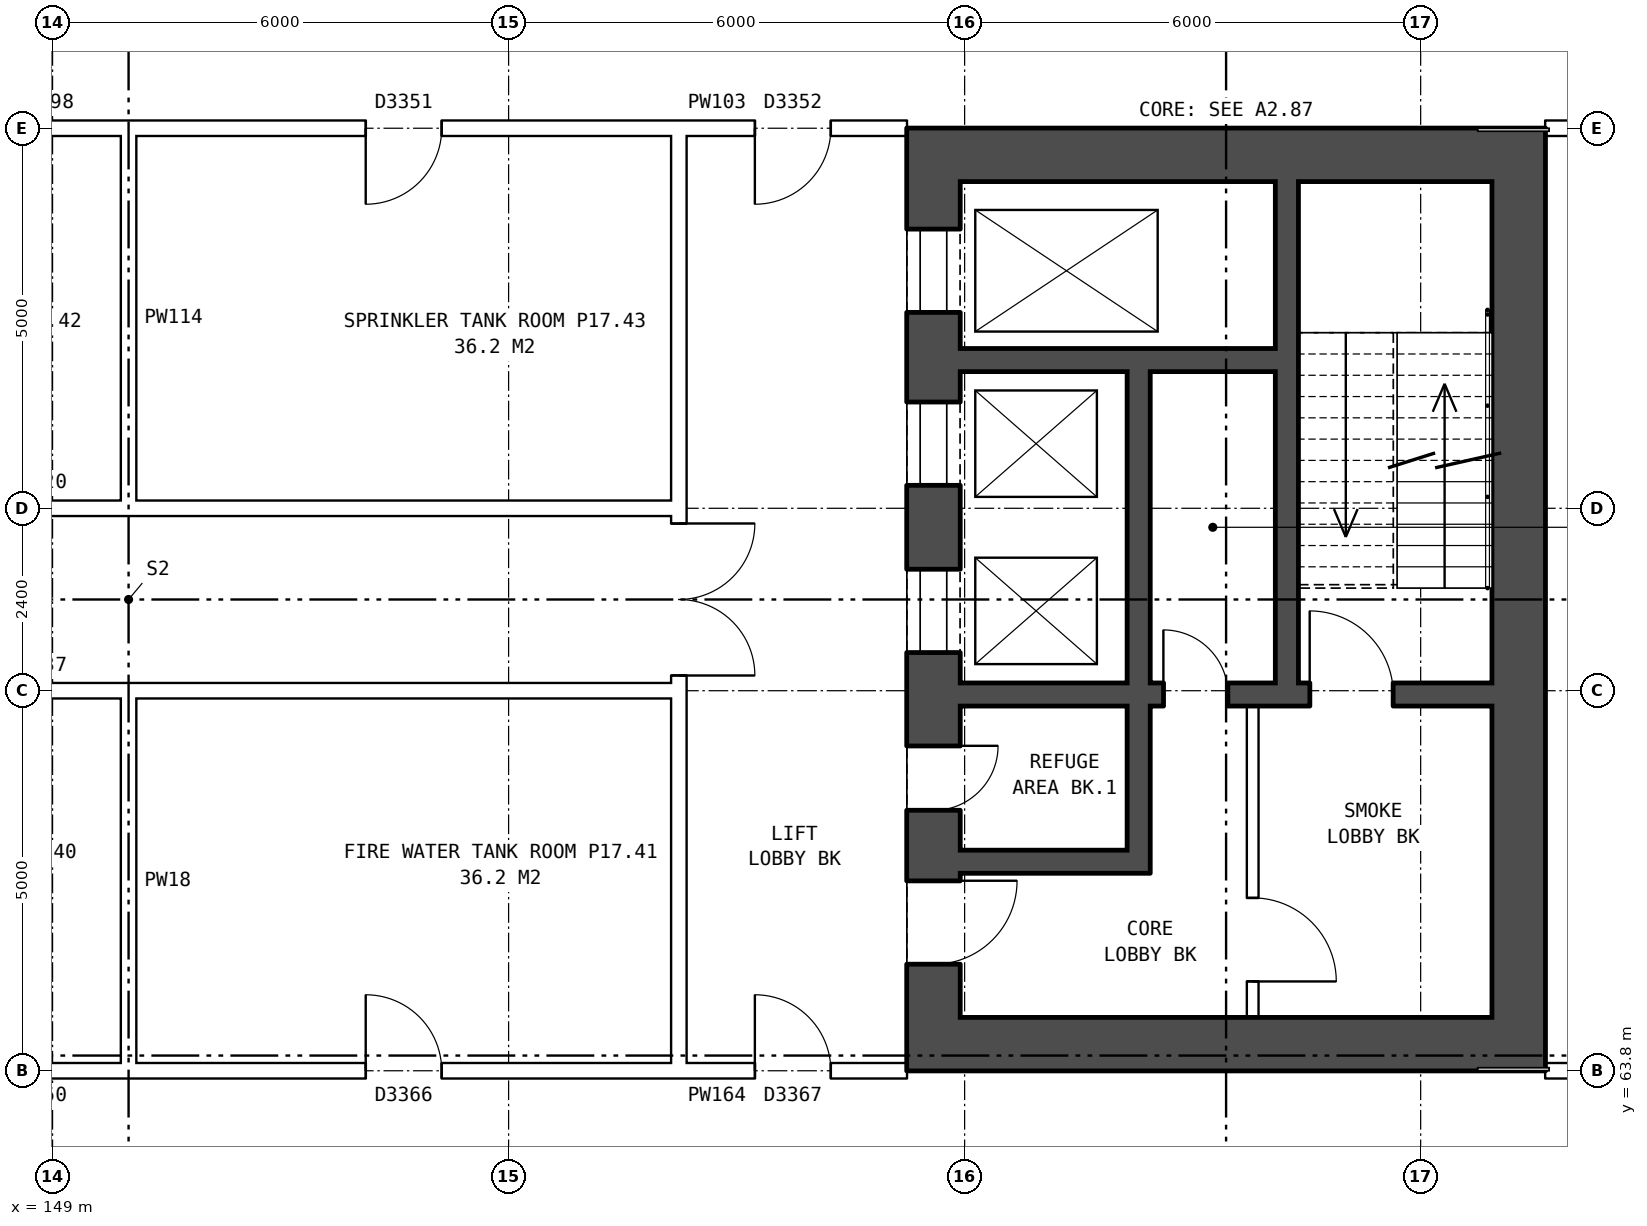
"""IFC4 building model, lengths in metres.
Left out: names, types, materials, properties, quantities, classifications, styles, units other than length and angle.
Written with IfcOpenShell. Run it as: python <this file> out.ifc"""

import sys

from ifc_helpers import new_model, si_unit, direction, frame, frame_2d, origin, place, context, subcontext, project, spatial, rectangle, extrude, element, fill, save


model = new_model("IFC4")
c1 = context("Model", 3, precision=1e-05, world=origin(), true_north=direction((0.0, 1.0)))
c2 = subcontext(c1, "Body", "Model", "MODEL_VIEW")
j1 = project(units=[si_unit("LENGTHUNIT", "METRE"), si_unit("PLANEANGLEUNIT", "RADIAN")], contexts=[c1])
p1 = place(None, origin())
s1 = spatial("IfcSite", under=j1, at=p1, CompositionType="ELEMENT")
p2 = place(p1, origin())
s2 = spatial("IfcBuilding", under=s1, at=p2, CompositionType="ELEMENT")
p3 = place(p2, frame((0.0, 0.0, 62.9)))
s3 = spatial("IfcBuildingStorey", under=s2, at=p3, CompositionType="ELEMENT", Elevation=62.9)
p4 = place(p3, frame((160.59, 75.5, 0.0), z_axis=(0.0, 0.0, 1.0), x_axis=(0.0, -1.0, 0.0)))
e1 = element("IfcWall", 1, at=p4, inside=s3, PredefinedType="SHEAR", context=c2, shape_type="SweptSolid", body=[
    extrude(rectangle(XDim=11.0, YDim=0.7, at=frame_2d((5.5, 0.0))), origin(), (0.0, 0.0, 1.0), 4.2),
])
p5 = place(p4, frame((0.625, 0.0, 0.0)))
e2 = element("IfcOpeningElement", 2, at=p5, cuts=e1, PredefinedType="OPENING", context=c2, shape_type="SweptSolid", body=[
    extrude(rectangle(XDim=1.1, YDim=2.1, at=frame_2d((0.55, 1.05))), frame((0.0, 0.36, 0.0), z_axis=(0.0, -1.0, 0.0), x_axis=(1.0, 0.0, 0.0)), (0.0, 0.0, 1.0), 0.72),
])
p6 = place(p4, frame((2.9, 0.0, 0.0)))
e3 = element("IfcOpeningElement", 3, at=p6, cuts=e1, PredefinedType="OPENING", context=c2, shape_type="SweptSolid", body=[
    extrude(rectangle(XDim=1.1, YDim=2.1, at=frame_2d((0.55, 1.05))), frame((0.0, 0.36, 0.0), z_axis=(0.0, -1.0, 0.0), x_axis=(1.0, 0.0, 0.0)), (0.0, 0.0, 1.0), 0.72),
])
p7 = place(p4, frame((5.1, 0.0, 0.0)))
e4 = element("IfcOpeningElement", 4, at=p7, cuts=e1, PredefinedType="OPENING", context=c2, shape_type="SweptSolid", body=[
    extrude(rectangle(XDim=1.1, YDim=2.1, at=frame_2d((0.55, 1.05))), frame((0.0, 0.36, 0.0), z_axis=(0.0, -1.0, 0.0), x_axis=(1.0, 0.0, 0.0)), (0.0, 0.0, 1.0), 0.72),
])
p8 = place(p4, frame((9.2, 0.0, 0.0)))
e5 = element("IfcOpeningElement", 5, at=p8, cuts=e1, PredefinedType="OPENING", context=c2, shape_type="SweptSolid", body=[
    extrude(rectangle(XDim=1.1, YDim=2.1, at=frame_2d((0.55, 1.05))), frame((0.0, 0.36, 0.0), z_axis=(0.0, -1.0, 0.0), x_axis=(1.0, 0.0, 0.0)), (0.0, 0.0, 1.0), 0.72),
])
p9 = place(p4, frame((7.425, 0.0, 0.0)))
e6 = element("IfcOpeningElement", 6, at=p9, cuts=e1, PredefinedType="OPENING", context=c2, shape_type="SweptSolid", body=[
    extrude(rectangle(XDim=0.85, YDim=2.1, at=frame_2d((0.425, 1.05))), frame((0.0, 0.36, 0.0), z_axis=(0.0, -1.0, 0.0), x_axis=(1.0, 0.0, 0.0)), (0.0, 0.0, 1.0), 0.72),
])
p10 = place(p3, frame((168.29, 75.5, 0.0), z_axis=(0.0, 0.0, 1.0), x_axis=(0.0, -1.0, 0.0)))
e7 = element("IfcWall", 7, at=p10, inside=s3, PredefinedType="SHEAR", context=c2, shape_type="SweptSolid", body=[
    extrude(rectangle(XDim=11.0, YDim=0.7, at=frame_2d((5.5, 0.0))), origin(), (0.0, 0.0, 1.0), 4.2),
])
for number, where, z_axis, x_axis in (
    (8, (160.24, 75.85, 0.0), (0.0, 0.0, 1.0), (1.0, 0.0, 0.0)),
    (9, (160.24, 64.15, 0.0), (0.0, 0.0, 1.0), (1.0, 0.0, 0.0)),
):
    element("IfcWall", number, at=place(p3, frame(where, z_axis=z_axis, x_axis=x_axis)), inside=s3, PredefinedType="SHEAR", context=c2, shape_type="SweptSolid", body=[
        extrude(rectangle(XDim=8.4, YDim=0.7, at=frame_2d((4.2, 0.0))), origin(), (0.0, 0.0, 1.0), 4.2),
    ])
p11 = place(p3, frame((160.94, 73.15, 0.0), z_axis=(0.0, 0.0, 1.0), x_axis=(1.0, 0.0, 0.0)))
e10 = element("IfcWall", 10, at=p11, inside=s3, PredefinedType="SHEAR", context=c2, shape_type="SweptSolid", body=[
    extrude(rectangle(XDim=4.15, YDim=0.3, at=frame_2d((2.075, 0.0))), origin(), (0.0, 0.0, 1.0), 4.2),
])
p12 = place(p3, frame((160.94, 68.75, 0.0), z_axis=(0.0, 0.0, 1.0), x_axis=(1.0, 0.0, 0.0)))
e11 = element("IfcWall", 11, at=p12, inside=s3, PredefinedType="SHEAR", context=c2, shape_type="SweptSolid", body=[
    extrude(rectangle(XDim=7.0, YDim=0.3, at=frame_2d((3.5, 0.0))), origin(), (0.0, 0.0, 1.0), 4.2),
])
p13 = place(p12, frame((4.6, 0.0, 0.0)))
e12 = element("IfcOpeningElement", 12, at=p13, cuts=e11, PredefinedType="OPENING", context=c2, shape_type="SweptSolid", body=[
    extrude(rectangle(XDim=1.1, YDim=2.1, at=frame_2d((0.55, 1.05))), frame((0.0, 0.16, 0.0), z_axis=(0.0, -1.0, 0.0), x_axis=(1.0, 0.0, 0.0)), (0.0, 0.0, 1.0), 0.32),
])
p14 = place(p12, frame((2.675, 0.0, 0.0)))
e13 = element("IfcOpeningElement", 13, at=p14, cuts=e11, PredefinedType="OPENING", context=c2, shape_type="SweptSolid", body=[
    extrude(rectangle(XDim=0.85, YDim=2.1, at=frame_2d((0.425, 1.05))), frame((0.0, 0.16, 0.0), z_axis=(0.0, -1.0, 0.0), x_axis=(1.0, 0.0, 0.0)), (0.0, 0.0, 1.0), 0.32),
])
p15 = place(p3, frame((160.94, 66.55, 0.0), z_axis=(0.0, 0.0, 1.0), x_axis=(1.0, 0.0, 0.0)))
e14 = element("IfcWall", 14, at=p15, inside=s3, PredefinedType="SHEAR", context=c2, shape_type="SweptSolid", body=[
    extrude(rectangle(XDim=2.2, YDim=0.3, at=frame_2d((1.1, 0.0))), origin(), (0.0, 0.0, 1.0), 4.2),
])
p16 = place(p3, frame((163.29, 73.0, 0.0), z_axis=(0.0, 0.0, 1.0), x_axis=(0.0, -1.0, 0.0)))
e15 = element("IfcWall", 15, at=p16, inside=s3, PredefinedType="SHEAR", context=c2, shape_type="SweptSolid", body=[
    extrude(rectangle(XDim=4.1, YDim=0.3, at=frame_2d((2.05, 0.0))), origin(), (0.0, 0.0, 1.0), 4.2),
])
p17 = place(p3, frame((163.29, 68.6, 0.0), z_axis=(0.0, 0.0, 1.0), x_axis=(0.0, -1.0, 0.0)))
e16 = element("IfcWall", 16, at=p17, inside=s3, PredefinedType="SHEAR", context=c2, shape_type="SweptSolid", body=[
    extrude(rectangle(XDim=2.2, YDim=0.3, at=frame_2d((1.1, 0.0))), origin(), (0.0, 0.0, 1.0), 4.2),
])
p18 = place(p3, frame((164.79, 68.6, 0.0), z_axis=(0.0, 0.0, 1.0), x_axis=(0.0, -1.0, 0.0)))
e17 = element("IfcWall", 17, at=p18, inside=s3, PredefinedType="PARTITIONING", context=c2, shape_type="SweptSolid", body=[
    extrude(rectangle(XDim=4.1, YDim=0.15, at=frame_2d((2.05, 0.0))), origin(), (0.0, 0.0, 1.0), 4.2),
])
p19 = place(p18, frame((2.525, 0.0, 0.0)))
e18 = element("IfcOpeningElement", 18, at=p19, cuts=e17, PredefinedType="OPENING", context=c2, shape_type="SweptSolid", body=[
    extrude(rectangle(XDim=1.1, YDim=2.1, at=frame_2d((0.55, 1.05))), frame((0.0, 0.085, 0.0), z_axis=(0.0, -1.0, 0.0), x_axis=(1.0, 0.0, 0.0)), (0.0, 0.0, 1.0), 0.17),
])
p20 = place(p3, frame((165.24, 75.5, 0.0), z_axis=(0.0, 0.0, 1.0), x_axis=(0.0, -1.0, 0.0)))
e19 = element("IfcWall", 19, at=p20, inside=s3, PredefinedType="SHEAR", context=c2, shape_type="SweptSolid", body=[
    extrude(rectangle(XDim=6.6, YDim=0.3, at=frame_2d((3.3, 0.0))), origin(), (0.0, 0.0, 1.0), 4.2),
])
p21 = place(p3, frame((157.24, 63.9, 0.0), z_axis=(0.0, 0.0, 1.0), x_axis=(0.0, 1.0, 0.0)))
e20 = element("IfcWall", 20, at=p21, inside=s3, PredefinedType="PARTITIONING", context=c2, shape_type="SweptSolid", body=[
    extrude(rectangle(XDim=12.2, YDim=0.2, at=frame_2d((6.1, 0.0))), origin(), (0.0, 0.0, 1.0), 4.2),
])
p22 = place(p21, frame((5.1, 0.0, 0.0)))
e21 = element("IfcOpeningElement", 21, at=p22, cuts=e20, PredefinedType="OPENING", context=c2, shape_type="SweptSolid", body=[
    extrude(rectangle(XDim=2.0, YDim=2.1, at=frame_2d((1.0, 1.05))), frame((0.0, 0.11, 0.0), z_axis=(0.0, -1.0, 0.0), x_axis=(1.0, 0.0, 0.0)), (0.0, 0.0, 1.0), 0.22),
])
p23 = place(p3, frame((142.76, 63.8, 0.0), z_axis=(0.0, 0.0, 1.0), x_axis=(1.0, 0.0, 0.0)))
e22 = element("IfcWall", 22, at=p23, inside=s3, PredefinedType="PARTITIONING", context=c2, shape_type="SweptSolid", body=[
    extrude(rectangle(XDim=14.48, YDim=0.2, at=frame_2d((7.24, 0.0))), origin(), (0.0, 0.0, 1.0), 4.2),
])
p24 = place(p23, frame((3.12, 0.0, 0.0)))
e23 = element("IfcOpeningElement", 23, at=p24, cuts=e22, PredefinedType="OPENING", context=c2, shape_type="SweptSolid", body=[
    extrude(rectangle(XDim=1.0, YDim=2.1, at=frame_2d((0.5, 1.05))), frame((0.0, 0.11, 0.0), z_axis=(0.0, -1.0, 0.0), x_axis=(1.0, 0.0, 0.0)), (0.0, 0.0, 1.0), 0.22),
])
p25 = place(p23, frame((10.36, 0.0, 0.0)))
e24 = element("IfcOpeningElement", 24, at=p25, cuts=e22, PredefinedType="OPENING", context=c2, shape_type="SweptSolid", body=[
    extrude(rectangle(XDim=1.0, YDim=2.1, at=frame_2d((0.5, 1.05))), frame((0.0, 0.11, 0.0), z_axis=(0.0, -1.0, 0.0), x_axis=(1.0, 0.0, 0.0)), (0.0, 0.0, 1.0), 0.22),
])
p26 = place(p3, frame((168.64, 63.8, 0.0), z_axis=(0.0, 0.0, 1.0), x_axis=(1.0, 0.0, 0.0)))
e25 = element("IfcWall", 25, at=p26, inside=s3, PredefinedType="PARTITIONING", context=c2, shape_type="SweptSolid", body=[
    extrude(rectangle(XDim=6.37, YDim=0.2, at=frame_2d((3.185, 0.0))), origin(), (0.0, 0.0, 1.0), 4.2),
])
p27 = place(p26, frame((2.625, 0.0, 0.0)))
e26 = element("IfcOpeningElement", 26, at=p27, cuts=e25, PredefinedType="OPENING", context=c2, shape_type="SweptSolid", body=[
    extrude(rectangle(XDim=1.0, YDim=2.1, at=frame_2d((0.5, 1.05))), frame((0.0, 0.11, 0.0), z_axis=(0.0, -1.0, 0.0), x_axis=(1.0, 0.0, 0.0)), (0.0, 0.0, 1.0), 0.22),
])
p28 = place(p3, frame((157.24, 63.8, 0.0), z_axis=(0.0, 0.0, 1.0), x_axis=(1.0, 0.0, 0.0)))
e27 = element("IfcWall", 27, at=p28, inside=s3, PredefinedType="PARTITIONING", context=c2, shape_type="SweptSolid", body=[
    extrude(rectangle(XDim=3.0, YDim=0.2, at=frame_2d((1.5, 0.0))), origin(), (0.0, 0.0, 1.0), 4.2),
])
p29 = place(p28, frame((1.0, 0.0, 0.0)))
e28 = element("IfcOpeningElement", 28, at=p29, cuts=e27, PredefinedType="OPENING", context=c2, shape_type="SweptSolid", body=[
    extrude(rectangle(XDim=1.0, YDim=2.1, at=frame_2d((0.5, 1.05))), frame((0.0, 0.11, 0.0), z_axis=(0.0, -1.0, 0.0), x_axis=(1.0, 0.0, 0.0)), (0.0, 0.0, 1.0), 0.22),
])
for number, where, z_axis, x_axis in (
    (29, (142.76, 68.8, 0.0), (0.0, 0.0, 1.0), (1.0, 0.0, 0.0)),
    (30, (142.76, 71.2, 0.0), (0.0, 0.0, 1.0), (1.0, 0.0, 0.0)),
):
    element("IfcWall", number, at=place(p3, frame(where, z_axis=z_axis, x_axis=x_axis)), inside=s3, PredefinedType="PARTITIONING", context=c2, shape_type="SweptSolid", body=[
        extrude(rectangle(XDim=14.48, YDim=0.2, at=frame_2d((7.24, 0.0))), origin(), (0.0, 0.0, 1.0), 4.2),
    ])
p30 = place(p3, frame((142.76, 76.2, 0.0), z_axis=(0.0, 0.0, 1.0), x_axis=(1.0, 0.0, 0.0)))
e31 = element("IfcWall", 31, at=p30, inside=s3, PredefinedType="PARTITIONING", context=c2, shape_type="SweptSolid", body=[
    extrude(rectangle(XDim=14.48, YDim=0.2, at=frame_2d((7.24, 0.0))), origin(), (0.0, 0.0, 1.0), 4.2),
])
p31 = place(p30, frame((3.12, 0.0, 0.0)))
e32 = element("IfcOpeningElement", 32, at=p31, cuts=e31, PredefinedType="OPENING", context=c2, shape_type="SweptSolid", body=[
    extrude(rectangle(XDim=1.0, YDim=2.1, at=frame_2d((0.5, 1.05))), frame((0.0, 0.11, 0.0), z_axis=(0.0, -1.0, 0.0), x_axis=(1.0, 0.0, 0.0)), (0.0, 0.0, 1.0), 0.22),
])
p32 = place(p30, frame((10.36, 0.0, 0.0)))
e33 = element("IfcOpeningElement", 33, at=p32, cuts=e31, PredefinedType="OPENING", context=c2, shape_type="SweptSolid", body=[
    extrude(rectangle(XDim=1.0, YDim=2.1, at=frame_2d((0.5, 1.05))), frame((0.0, 0.11, 0.0), z_axis=(0.0, -1.0, 0.0), x_axis=(1.0, 0.0, 0.0)), (0.0, 0.0, 1.0), 0.22),
])
p33 = place(p3, frame((168.64, 76.2, 0.0), z_axis=(0.0, 0.0, 1.0), x_axis=(1.0, 0.0, 0.0)))
e34 = element("IfcWall", 34, at=p33, inside=s3, PredefinedType="PARTITIONING", context=c2, shape_type="SweptSolid", body=[
    extrude(rectangle(XDim=6.37, YDim=0.2, at=frame_2d((3.185, 0.0))), origin(), (0.0, 0.0, 1.0), 4.2),
])
p34 = place(p3, frame((157.24, 76.2, 0.0), z_axis=(0.0, 0.0, 1.0), x_axis=(1.0, 0.0, 0.0)))
e35 = element("IfcWall", 35, at=p34, inside=s3, PredefinedType="PARTITIONING", context=c2, shape_type="SweptSolid", body=[
    extrude(rectangle(XDim=3.0, YDim=0.2, at=frame_2d((1.5, 0.0))), origin(), (0.0, 0.0, 1.0), 4.2),
])
p35 = place(p34, frame((1.0, 0.0, 0.0)))
e36 = element("IfcOpeningElement", 36, at=p35, cuts=e35, PredefinedType="OPENING", context=c2, shape_type="SweptSolid", body=[
    extrude(rectangle(XDim=1.0, YDim=2.1, at=frame_2d((0.5, 1.05))), frame((0.0, 0.11, 0.0), z_axis=(0.0, -1.0, 0.0), x_axis=(1.0, 0.0, 0.0)), (0.0, 0.0, 1.0), 0.22),
])
for number, where, z_axis, x_axis in (
    (37, (150.0, 63.7, 0.0), (0.0, 0.0, 1.0), (0.0, 1.0, 0.0)),
    (38, (150.0, 71.1, 0.0), (0.0, 0.0, 1.0), (0.0, 1.0, 0.0)),
):
    element("IfcWall", number, at=place(p3, frame(where, z_axis=z_axis, x_axis=x_axis)), inside=s3, PredefinedType="PARTITIONING", context=c2, shape_type="SweptSolid", body=[
        extrude(rectangle(XDim=5.2, YDim=0.2, at=frame_2d((2.6, 0.0))), origin(), (0.0, 0.0, 1.0), 4.2),
    ])
p36 = place(p5, origin())
e39 = element("IfcDoor", 39, at=p36, inside=s3, OperationType="DOUBLE_DOOR_SLIDING", PredefinedType="DOOR", context=c2, shape_type="SweptSolid", body=[
    extrude(rectangle(XDim=1.1, YDim=2.1, at=frame_2d((0.55, 1.05))), frame((0.0, 0.335, 0.0), z_axis=(0.0, -1.0, 0.0), x_axis=(1.0, 0.0, 0.0)), (0.0, 0.0, 1.0), 0.05),
])
fill(e2, e39)
p37 = place(p6, origin())
e40 = element("IfcDoor", 40, at=p37, inside=s3, OperationType="DOUBLE_DOOR_SLIDING", PredefinedType="DOOR", context=c2, shape_type="SweptSolid", body=[
    extrude(rectangle(XDim=1.1, YDim=2.1, at=frame_2d((0.55, 1.05))), frame((0.0, 0.335, 0.0), z_axis=(0.0, -1.0, 0.0), x_axis=(1.0, 0.0, 0.0)), (0.0, 0.0, 1.0), 0.05),
])
fill(e3, e40)
p38 = place(p7, origin())
e41 = element("IfcDoor", 41, at=p38, inside=s3, OperationType="DOUBLE_DOOR_SLIDING", PredefinedType="DOOR", context=c2, shape_type="SweptSolid", body=[
    extrude(rectangle(XDim=1.1, YDim=2.1, at=frame_2d((0.55, 1.05))), frame((0.0, 0.335, 0.0), z_axis=(0.0, -1.0, 0.0), x_axis=(1.0, 0.0, 0.0)), (0.0, 0.0, 1.0), 0.05),
])
fill(e4, e41)
p39 = place(p8, origin())
e42 = element("IfcDoor", 42, at=p39, inside=s3, OperationType="SINGLE_SWING_LEFT", PredefinedType="DOOR", context=c2, shape_type="SweptSolid", body=[
    extrude(rectangle(XDim=1.1, YDim=2.1, at=frame_2d((0.55, 1.05))), frame((0.0, 0.335, 0.0), z_axis=(0.0, -1.0, 0.0), x_axis=(1.0, 0.0, 0.0)), (0.0, 0.0, 1.0), 0.05),
])
fill(e5, e42)
p40 = place(p19, origin())
e43 = element("IfcDoor", 43, at=p40, inside=s3, OperationType="SINGLE_SWING_RIGHT", PredefinedType="DOOR", context=c2, shape_type="SweptSolid", body=[
    extrude(rectangle(XDim=1.1, YDim=2.1, at=frame_2d((0.55, 1.05))), frame((0.0, 0.025, 0.0), z_axis=(0.0, -1.0, 0.0), x_axis=(1.0, 0.0, 0.0)), (0.0, 0.0, 1.0), 0.05),
])
fill(e18, e43)
p41 = place(p13, origin())
e44 = element("IfcDoor", 44, at=p41, inside=s3, OperationType="SINGLE_SWING_LEFT", PredefinedType="DOOR", context=c2, shape_type="SweptSolid", body=[
    extrude(rectangle(XDim=1.1, YDim=2.1, at=frame_2d((0.55, 1.05))), frame((0.0, 0.025, 0.0), z_axis=(0.0, -1.0, 0.0), x_axis=(1.0, 0.0, 0.0)), (0.0, 0.0, 1.0), 0.05),
])
fill(e12, e44)
p42 = place(p9, origin())
e45 = element("IfcDoor", 45, at=p42, inside=s3, OperationType="SINGLE_SWING_LEFT", PredefinedType="DOOR", context=c2, shape_type="SweptSolid", body=[
    extrude(rectangle(XDim=0.85, YDim=2.1, at=frame_2d((0.425, 1.05))), frame((0.0, 0.335, 0.0), z_axis=(0.0, -1.0, 0.0), x_axis=(1.0, 0.0, 0.0)), (0.0, 0.0, 1.0), 0.05),
])
fill(e6, e45)
p43 = place(p14, origin())
e46 = element("IfcDoor", 46, at=p43, inside=s3, OperationType="SINGLE_SWING_LEFT", PredefinedType="DOOR", context=c2, shape_type="SweptSolid", body=[
    extrude(rectangle(XDim=0.85, YDim=2.1, at=frame_2d((0.425, 1.05))), frame((0.0, 0.025, 0.0), z_axis=(0.0, -1.0, 0.0), x_axis=(1.0, 0.0, 0.0)), (0.0, 0.0, 1.0), 0.05),
])
fill(e13, e46)
p44 = place(p22, frame((2.0, 0.0, 0.0), z_axis=(0.0, 0.0, 1.0), x_axis=(-1.0, 0.0, 0.0)))
e47 = element("IfcDoor", 47, at=p44, inside=s3, OperationType="DOUBLE_DOOR_SINGLE_SWING", PredefinedType="DOOR", context=c2, shape_type="SweptSolid", body=[
    extrude(rectangle(XDim=2.0, YDim=2.1, at=frame_2d((1.0, 1.05))), frame((0.0, 0.025, 0.0), z_axis=(0.0, -1.0, 0.0), x_axis=(1.0, 0.0, 0.0)), (0.0, 0.0, 1.0), 0.05),
])
fill(e21, e47)
p45 = place(p25, origin())
e48 = element("IfcDoor", 48, at=p45, inside=s3, OperationType="SINGLE_SWING_LEFT", PredefinedType="DOOR", context=c2, shape_type="SweptSolid", body=[
    extrude(rectangle(XDim=1.0, YDim=2.1, at=frame_2d((0.5, 1.05))), frame((0.0, 0.025, 0.0), z_axis=(0.0, -1.0, 0.0), x_axis=(1.0, 0.0, 0.0)), (0.0, 0.0, 1.0), 0.05),
])
fill(e24, e48)
p46 = place(p29, origin())
e49 = element("IfcDoor", 49, at=p46, inside=s3, OperationType="SINGLE_SWING_LEFT", PredefinedType="DOOR", context=c2, shape_type="SweptSolid", body=[
    extrude(rectangle(XDim=1.0, YDim=2.1, at=frame_2d((0.5, 1.05))), frame((0.0, 0.025, 0.0), z_axis=(0.0, -1.0, 0.0), x_axis=(1.0, 0.0, 0.0)), (0.0, 0.0, 1.0), 0.05),
])
fill(e28, e49)
p47 = place(p32, frame((1.0, 0.0, 0.0), z_axis=(0.0, 0.0, 1.0), x_axis=(-1.0, 0.0, 0.0)))
e50 = element("IfcDoor", 50, at=p47, inside=s3, OperationType="SINGLE_SWING_RIGHT", PredefinedType="DOOR", context=c2, shape_type="SweptSolid", body=[
    extrude(rectangle(XDim=1.0, YDim=2.1, at=frame_2d((0.5, 1.05))), frame((0.0, 0.025, 0.0), z_axis=(0.0, -1.0, 0.0), x_axis=(1.0, 0.0, 0.0)), (0.0, 0.0, 1.0), 0.05),
])
fill(e33, e50)
p48 = place(p35, frame((1.0, 0.0, 0.0), z_axis=(0.0, 0.0, 1.0), x_axis=(-1.0, 0.0, 0.0)))
e51 = element("IfcDoor", 51, at=p48, inside=s3, OperationType="SINGLE_SWING_RIGHT", PredefinedType="DOOR", context=c2, shape_type="SweptSolid", body=[
    extrude(rectangle(XDim=1.0, YDim=2.1, at=frame_2d((0.5, 1.05))), frame((0.0, 0.025, 0.0), z_axis=(0.0, -1.0, 0.0), x_axis=(1.0, 0.0, 0.0)), (0.0, 0.0, 1.0), 0.05),
])
fill(e36, e51)
save(model, sys.argv[1])
